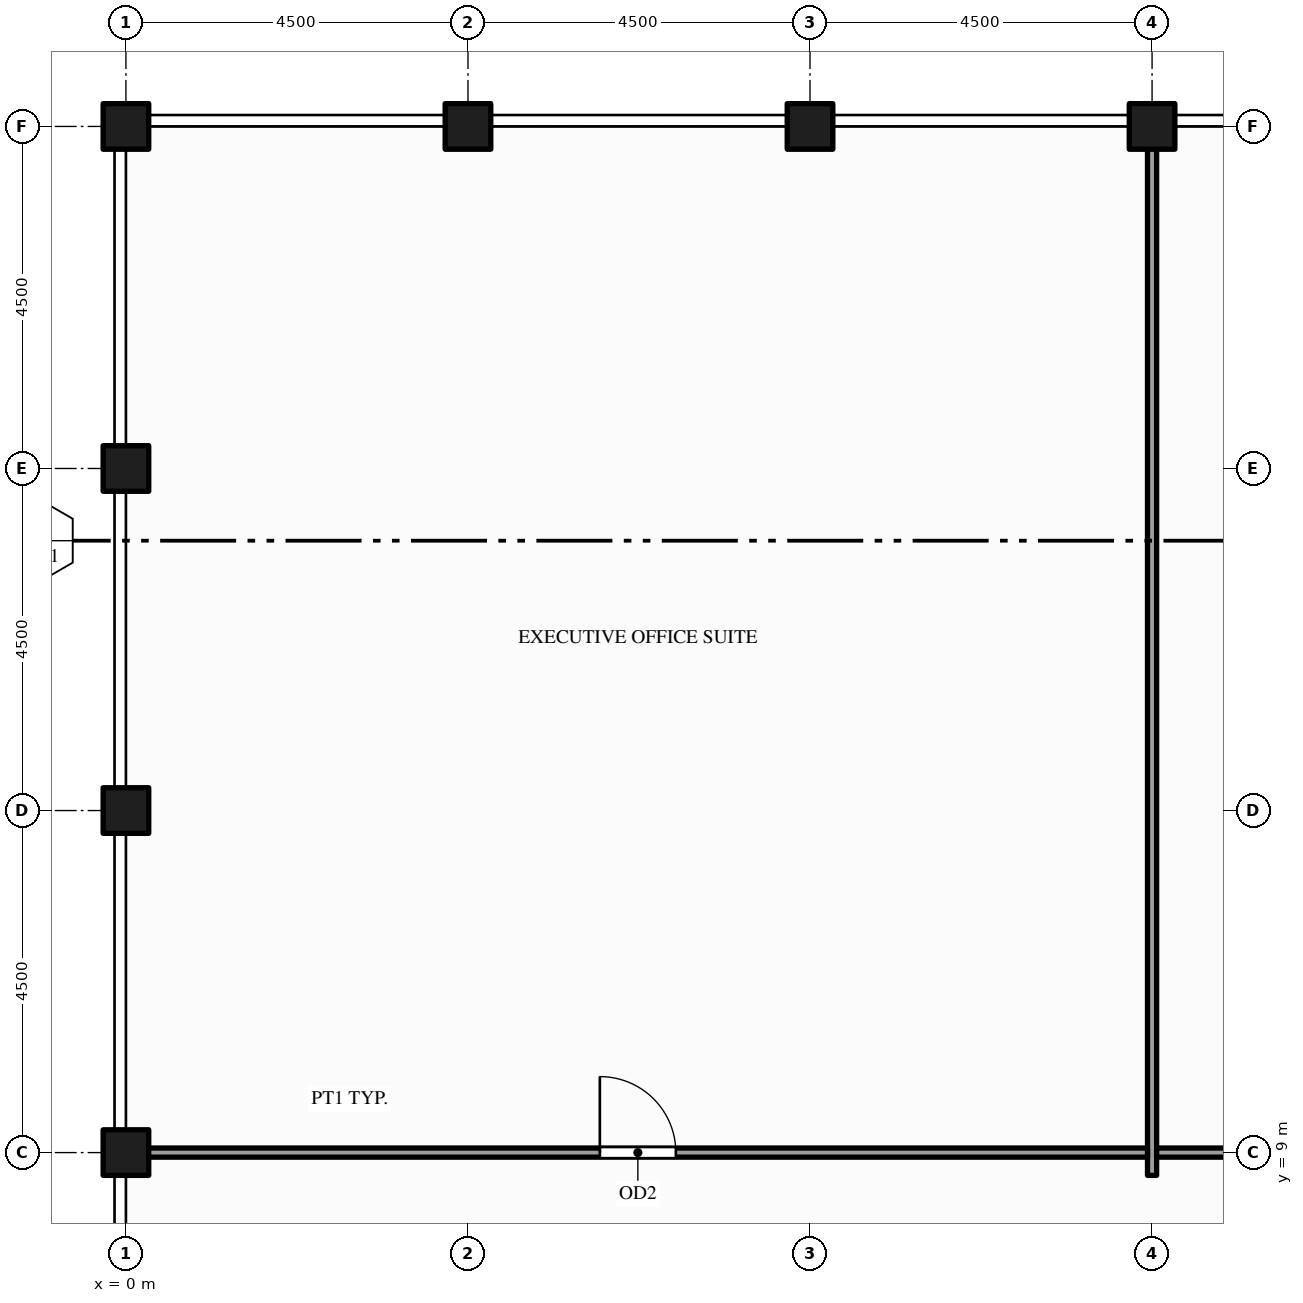
"""IFC4 building model, lengths in metres.
Left out: names, types, materials, properties, quantities, classifications, styles, units other than length and angle.
Written with IfcOpenShell. Run it as: python <this file> out.ifc"""

import sys

from ifc_helpers import new_model, si_unit, direction, frame, frame_2d, origin, origin_2d, place, context, subcontext, project, spatial, rectangle, hollow_rectangle, extrude, element, fill, save


model = new_model("IFC4")
c1 = context("Model", 3, precision=1e-05, world=origin(), true_north=direction((0.0, 1.0)))
c2 = subcontext(c1, "Body", "Model", "MODEL_VIEW")
j1 = project(units=[si_unit("LENGTHUNIT", "METRE"), si_unit("PLANEANGLEUNIT", "RADIAN")], contexts=[c1])
p1 = place(None, origin())
s1 = spatial("IfcSite", under=j1, at=p1, CompositionType="ELEMENT")
p2 = place(p1, origin())
s2 = spatial("IfcBuilding", under=s1, at=p2, CompositionType="ELEMENT")
p3 = place(p2, frame((0.0, 0.0, 336.5)))
s3 = spatial("IfcBuildingStorey", under=s2, at=p3, CompositionType="ELEMENT", Elevation=336.5)
for number, where, z_axis, x_axis in (
    (1, (0.0, 9.0, -0.15), (0.0, 0.0, 1.0), (1.0, 0.0, 0.0)),
    (2, (0.0, 13.5, -0.15), (0.0, 0.0, 1.0), (1.0, 0.0, 0.0)),
    (3, (0.0, 18.0, -0.15), (0.0, 0.0, 1.0), (1.0, 0.0, 0.0)),
    (4, (0.0, 22.5, -0.15), (0.0, 0.0, 1.0), (1.0, 0.0, 0.0)),
    (5, (4.5, 22.5, -0.15), (0.0, 0.0, 1.0), (1.0, 0.0, 0.0)),
    (6, (9.0, 22.5, -0.15), (0.0, 0.0, 1.0), (1.0, 0.0, 0.0)),
    (7, (13.5, 22.5, -0.15), (0.0, 0.0, 1.0), (1.0, 0.0, 0.0)),
):
    element("IfcColumn", number, at=place(p3, frame(where, z_axis=z_axis, x_axis=x_axis)), inside=s3, PredefinedType="COLUMN", context=c2, shape_type="SweptSolid", body=[
        extrude(hollow_rectangle(XDim=0.6, YDim=0.6, WallThickness=0.03, at=origin_2d()), origin(), (0.0, 0.0, 1.0), 4.5),
    ])
p4 = place(p3, frame((13.5, 8.7, 0.0), z_axis=(0.0, 0.0, 1.0), x_axis=(0.0, 1.0, 0.0)))
e8 = element("IfcWall", 8, at=p4, inside=s3, PredefinedType="PARTITIONING", context=c2, shape_type="SweptSolid", body=[
    extrude(rectangle(XDim=13.79, YDim=0.12, at=frame_2d((6.895, 0.0))), origin(), (0.0, 0.0, 1.0), 3.359),
])
p5 = place(p3, frame((0.01, 9.0, 0.0), z_axis=(0.0, 0.0, 1.0), x_axis=(1.0, 0.0, 0.0)))
e9 = element("IfcWall", 9, at=p5, inside=s3, PredefinedType="PARTITIONING", context=c2, shape_type="SweptSolid", body=[
    extrude(rectangle(XDim=13.43, YDim=0.12, at=frame_2d((6.715, 0.0))), origin(), (0.0, 0.0, 1.0), 3.359),
])
p6 = place(p5, frame((6.225, 0.0, 0.0)))
e10 = element("IfcOpeningElement", 10, at=p6, cuts=e9, PredefinedType="OPENING", context=c2, shape_type="SweptSolid", body=[
    extrude(rectangle(XDim=1.0, YDim=2.1, at=frame_2d((0.5, 1.05))), frame((0.0, 0.07, 0.0), z_axis=(0.0, -1.0, 0.0), x_axis=(1.0, 0.0, 0.0)), (0.0, 0.0, 1.0), 0.14),
])
p7 = place(p3, frame((13.56, 9.0, 0.0), z_axis=(0.0, 0.0, 1.0), x_axis=(1.0, 0.0, 0.0)))
e11 = element("IfcWall", 11, at=p7, inside=s3, PredefinedType="PARTITIONING", context=c2, shape_type="SweptSolid", body=[
    extrude(rectangle(XDim=4.38, YDim=0.12, at=frame_2d((2.19, 0.0))), origin(), (0.0, 0.0, 1.0), 3.359),
])
p8 = place(p7, frame((1.69, 0.0, 0.0)))
e12 = element("IfcOpeningElement", 12, at=p8, cuts=e11, PredefinedType="OPENING", context=c2, shape_type="SweptSolid", body=[
    extrude(rectangle(XDim=1.0, YDim=2.1, at=frame_2d((0.5, 1.05))), frame((0.0, 0.07, 0.0), z_axis=(0.0, -1.0, 0.0), x_axis=(1.0, 0.0, 0.0)), (0.0, 0.0, 1.0), 0.14),
])
p9 = place(p6, origin())
e13 = element("IfcDoor", 13, at=p9, inside=s3, OperationType="SINGLE_SWING_LEFT", PredefinedType="DOOR", context=c2, shape_type="SweptSolid", body=[
    extrude(rectangle(XDim=1.0, YDim=2.1, at=frame_2d((0.5, 1.05))), frame((0.0, 0.025, 0.0), z_axis=(0.0, -1.0, 0.0), x_axis=(1.0, 0.0, 0.0)), (0.0, 0.0, 1.0), 0.05),
])
fill(e10, e13)
save(model, sys.argv[1])
